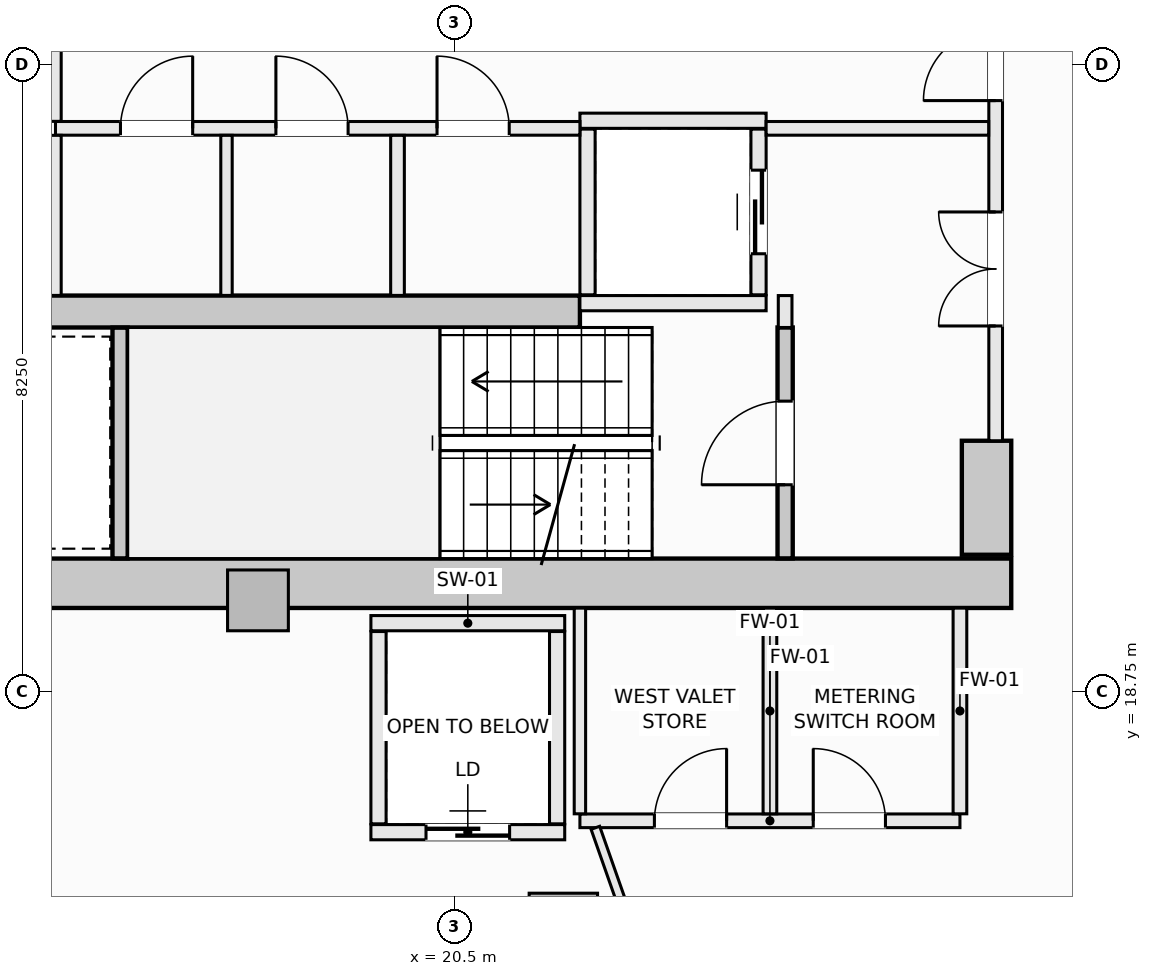
"""IFC4 building model, lengths in metres.
Left out: names, types, materials, properties, quantities, classifications, styles, units other than length and angle.
Written with IfcOpenShell. Run it as: python <this file> out.ifc"""

import sys

from ifc_helpers import new_model, si_unit, direction, frame, frame_2d, origin, origin_2d, place, context, subcontext, project, spatial, rectangle, extrude, element, fill, save


model = new_model("IFC4")
c1 = context("Model", 3, precision=1e-05, world=origin(), true_north=direction((0.0, 1.0)))
c2 = subcontext(c1, "Body", "Model", "MODEL_VIEW")
j1 = project(units=[si_unit("LENGTHUNIT", "METRE"), si_unit("PLANEANGLEUNIT", "RADIAN")], contexts=[c1])
p1 = place(None, origin())
s1 = spatial("IfcSite", under=j1, at=p1, CompositionType="ELEMENT")
p2 = place(p1, origin())
s2 = spatial("IfcBuilding", under=s1, at=p2, CompositionType="ELEMENT")
p3 = place(p2, frame((0.0, 0.0, 125.7)))
s3 = spatial("IfcBuildingStorey", under=s2, at=p3, CompositionType="ELEMENT", Elevation=125.7)
p4 = place(p3, frame((14.175, 20.175, -0.27), z_axis=(0.0, 0.0, 1.0), x_axis=(1.0, 0.0, 0.0)))
e1 = element("IfcWall", 1, at=p4, inside=s3, PredefinedType="SHEAR", context=c2, shape_type="SweptSolid", body=[
    extrude(rectangle(XDim=13.65, YDim=0.65, at=frame_2d((6.825, 0.0))), origin(), (0.0, 0.0, 1.0), 3.4),
])
p5 = place(p3, frame((27.5, 20.55, -0.27), z_axis=(0.0, 0.0, 1.0), x_axis=(0.0, 1.0, 0.0)))
e2 = element("IfcWall", 2, at=p5, inside=s3, PredefinedType="SHEAR", context=c2, shape_type="SweptSolid", body=[
    extrude(rectangle(XDim=1.5, YDim=0.65, at=frame_2d((0.75, 0.0))), origin(), (0.0, 0.0, 1.0), 3.4),
])
p6 = place(p3, frame((14.85, 23.75, -0.27), z_axis=(0.0, 0.0, 1.0), x_axis=(1.0, 0.0, 0.0)))
e3 = element("IfcWall", 3, at=p6, inside=s3, PredefinedType="SHEAR", context=c2, shape_type="SweptSolid", body=[
    extrude(rectangle(XDim=7.3, YDim=0.42, at=frame_2d((3.65, 0.0))), origin(), (0.0, 0.0, 1.0), 3.4),
])
p7 = place(p3, frame((21.932, 15.648, -0.27), z_axis=(0.0, 0.0, 1.0), x_axis=(1.0, 0.0, 0.0)))
e4 = element("IfcColumn", 4, at=p7, inside=s3, PredefinedType="COLUMN", context=c2, shape_type="SweptSolid", body=[
    extrude(rectangle(XDim=0.9, YDim=0.9, at=origin_2d()), origin(), (0.0, 0.0, 1.0), 3.4),
])
p8 = place(p3, frame((17.914, 19.95, -0.27), z_axis=(0.0, 0.0, 1.0), x_axis=(1.0, 0.0, 0.0)))
e5 = element("IfcColumn", 5, at=p8, inside=s3, PredefinedType="PILASTER", context=c2, shape_type="SweptSolid", body=[
    extrude(rectangle(XDim=0.8, YDim=0.8, at=origin_2d()), origin(), (0.0, 0.0, 1.0), 3.4),
])
p9 = place(p3, frame((24.85, 20.502, -0.27), z_axis=(0.0, 0.0, 1.0), x_axis=(0.0, 1.0, 0.0)))
e6 = element("IfcWall", 6, at=p9, inside=s3, PredefinedType="SHEAR", context=c2, shape_type="SweptSolid", body=[
    extrude(rectangle(XDim=3.038, YDim=0.2, at=frame_2d((1.519, 0.0))), origin(), (0.0, 0.0, 1.0), 3.4),
])
p10 = place(p9, frame((0.969, 0.0, 0.27)))
e7 = element("IfcOpeningElement", 7, at=p10, cuts=e6, PredefinedType="OPENING", context=c2, shape_type="SweptSolid", body=[
    extrude(rectangle(XDim=1.1, YDim=2.15, at=frame_2d((0.55, 1.075))), frame((0.0, 0.11, 0.0), z_axis=(0.0, -1.0, 0.0), x_axis=(1.0, 0.0, 0.0)), (0.0, 0.0, 1.0), 0.22),
])
p11 = place(p3, frame((16.1, 20.502, -0.27), z_axis=(0.0, 0.0, 1.0), x_axis=(0.0, 1.0, 0.0)))
e8 = element("IfcWall", 8, at=p11, inside=s3, PredefinedType="SHEAR", context=c2, shape_type="SweptSolid", body=[
    extrude(rectangle(XDim=3.036, YDim=0.2, at=frame_2d((1.518, 0.0))), origin(), (0.0, 0.0, 1.0), 3.4),
])
for number, where, z_axis, x_axis in (
    (9, (22.15, 26.26, 0.0), (0.0, 0.0, 1.0), (1.0, 0.0, 0.0)),
    (10, (22.15, 23.86, 0.0), (0.0, 0.0, 1.0), (1.0, 0.0, 0.0)),
):
    element("IfcWall", number, at=place(p3, frame(where, z_axis=z_axis, x_axis=x_axis)), inside=s3, PredefinedType="SOLIDWALL", context=c2, shape_type="SweptSolid", body=[
        extrude(rectangle(XDim=2.45, YDim=0.2, at=frame_2d((1.225, 0.0))), origin(), (0.0, 0.0, 1.0), 3.13),
    ])
p12 = place(p3, frame((22.25, 23.97, 0.0), z_axis=(0.0, 0.0, 1.0), x_axis=(0.0, 1.0, 0.0)))
e11 = element("IfcWall", 11, at=p12, inside=s3, PredefinedType="SOLIDWALL", context=c2, shape_type="SweptSolid", body=[
    extrude(rectangle(XDim=2.18, YDim=0.2, at=frame_2d((1.09, 0.0))), origin(), (0.0, 0.0, 1.0), 3.13),
])
p13 = place(p3, frame((24.5, 23.97, 0.0), z_axis=(0.0, 0.0, 1.0), x_axis=(0.0, 1.0, 0.0)))
e12 = element("IfcWall", 12, at=p13, inside=s3, PredefinedType="SOLIDWALL", context=c2, shape_type="SweptSolid", body=[
    extrude(rectangle(XDim=2.18, YDim=0.2, at=frame_2d((1.09, 0.0))), origin(), (0.0, 0.0, 1.0), 3.13),
])
p14 = place(p13, frame((0.54, 0.0, 0.0)))
e13 = element("IfcOpeningElement", 13, at=p14, cuts=e12, PredefinedType="OPENING", context=c2, shape_type="SweptSolid", body=[
    extrude(rectangle(XDim=1.1, YDim=2.2, at=frame_2d((0.55, 1.1))), frame((0.0, 0.11, 0.0), z_axis=(0.0, -1.0, 0.0), x_axis=(1.0, 0.0, 0.0)), (0.0, 0.0, 1.0), 0.22),
])
p15 = place(p3, frame((19.4, 19.65, 0.0), z_axis=(0.0, 0.0, 1.0), x_axis=(1.0, 0.0, 0.0)))
e14 = element("IfcWall", 14, at=p15, inside=s3, PredefinedType="SOLIDWALL", context=c2, shape_type="SweptSolid", body=[
    extrude(rectangle(XDim=2.55, YDim=0.2, at=frame_2d((1.275, 0.0))), origin(), (0.0, 0.0, 1.0), 3.13),
])
p16 = place(p3, frame((19.4, 16.9, 0.0), z_axis=(0.0, 0.0, 1.0), x_axis=(1.0, 0.0, 0.0)))
e15 = element("IfcWall", 15, at=p16, inside=s3, PredefinedType="SOLIDWALL", context=c2, shape_type="SweptSolid", body=[
    extrude(rectangle(XDim=2.55, YDim=0.2, at=frame_2d((1.275, 0.0))), origin(), (0.0, 0.0, 1.0), 3.13),
])
p17 = place(p16, frame((0.725, 0.0, 0.0)))
e16 = element("IfcOpeningElement", 16, at=p17, cuts=e15, PredefinedType="OPENING", context=c2, shape_type="SweptSolid", body=[
    extrude(rectangle(XDim=1.1, YDim=2.2, at=frame_2d((0.55, 1.1))), frame((0.0, 0.11, 0.0), z_axis=(0.0, -1.0, 0.0), x_axis=(1.0, 0.0, 0.0)), (0.0, 0.0, 1.0), 0.22),
])
for number, where, z_axis, x_axis in (
    (17, (19.5, 17.01, 0.0), (0.0, 0.0, 1.0), (0.0, 1.0, 0.0)),
    (18, (21.85, 17.01, 0.0), (0.0, 0.0, 1.0), (0.0, 1.0, 0.0)),
):
    element("IfcWall", number, at=place(p3, frame(where, z_axis=z_axis, x_axis=x_axis)), inside=s3, PredefinedType="SOLIDWALL", context=c2, shape_type="SweptSolid", body=[
        extrude(rectangle(XDim=2.53, YDim=0.2, at=frame_2d((1.265, 0.0))), origin(), (0.0, 0.0, 1.0), 3.13),
    ])
p18 = place(p3, frame((24.85, 23.54, 0.0), z_axis=(0.0, 0.0, 1.0), x_axis=(0.0, 1.0, 0.0)))
e19 = element("IfcWall", 19, at=p18, inside=s3, PredefinedType="SOLIDWALL", context=c2, shape_type="SweptSolid", body=[
    extrude(rectangle(XDim=0.42, YDim=0.18, at=frame_2d((0.21, 0.0))), origin(), (0.0, 0.0, 1.0), 3.13),
])
p19 = place(p3, frame((27.62, 22.05, 0.0), z_axis=(0.0, 0.0, 1.0), x_axis=(0.0, 1.0, 0.0)))
e20 = element("IfcWall", 20, at=p19, inside=s3, PredefinedType="SOLIDWALL", context=c2, shape_type="SweptSolid", body=[
    extrude(rectangle(XDim=9.9, YDim=0.18, at=frame_2d((4.95, 0.0))), origin(), (0.0, 0.0, 1.0), 3.13),
])
p20 = place(p19, frame((4.475, 0.0, 0.0)))
e21 = element("IfcOpeningElement", 21, at=p20, cuts=e20, PredefinedType="OPENING", context=c2, shape_type="SweptSolid", body=[
    extrude(rectangle(XDim=0.95, YDim=2.1, at=frame_2d((0.475, 1.05))), frame((0.0, 0.1, 0.0), z_axis=(0.0, -1.0, 0.0), x_axis=(1.0, 0.0, 0.0)), (0.0, 0.0, 1.0), 0.2),
])
p21 = place(p19, frame((6.89, 0.0, 0.0)))
e22 = element("IfcOpeningElement", 22, at=p21, cuts=e20, PredefinedType="OPENING", context=c2, shape_type="SweptSolid", body=[
    extrude(rectangle(XDim=1.5, YDim=2.2, at=frame_2d((0.75, 1.1))), frame((0.0, 0.1, 0.0), z_axis=(0.0, -1.0, 0.0), x_axis=(1.0, 0.0, 0.0)), (0.0, 0.0, 1.0), 0.2),
])
p22 = place(p19, frame((1.51, 0.0, 0.0)))
e23 = element("IfcOpeningElement", 23, at=p22, cuts=e20, PredefinedType="OPENING", context=c2, shape_type="SweptSolid", body=[
    extrude(rectangle(XDim=1.5, YDim=2.2, at=frame_2d((0.75, 1.1))), frame((0.0, 0.1, 0.0), z_axis=(0.0, -1.0, 0.0), x_axis=(1.0, 0.0, 0.0)), (0.0, 0.0, 1.0), 0.2),
])
p23 = place(p3, frame((15.25, 26.16, 0.0), z_axis=(0.0, 0.0, 1.0), x_axis=(1.0, 0.0, 0.0)))
e24 = element("IfcWall", 24, at=p23, inside=s3, PredefinedType="SOLIDWALL", context=c2, shape_type="SweptSolid", body=[
    extrude(rectangle(XDim=6.9, YDim=0.18, at=frame_2d((3.45, 0.0))), origin(), (0.0, 0.0, 1.0), 3.13),
])
p24 = place(p23, frame((5.02, 0.0, 0.0)))
e25 = element("IfcOpeningElement", 25, at=p24, cuts=e24, PredefinedType="OPENING", context=c2, shape_type="SweptSolid", body=[
    extrude(rectangle(XDim=0.95, YDim=2.1, at=frame_2d((0.475, 1.05))), frame((0.0, 0.1, 0.0), z_axis=(0.0, -1.0, 0.0), x_axis=(1.0, 0.0, 0.0)), (0.0, 0.0, 1.0), 0.2),
])
p25 = place(p23, frame((0.855, 0.0, 0.0)))
e26 = element("IfcOpeningElement", 26, at=p25, cuts=e24, PredefinedType="OPENING", context=c2, shape_type="SweptSolid", body=[
    extrude(rectangle(XDim=0.95, YDim=2.1, at=frame_2d((0.475, 1.05))), frame((0.0, 0.1, 0.0), z_axis=(0.0, -1.0, 0.0), x_axis=(1.0, 0.0, 0.0)), (0.0, 0.0, 1.0), 0.2),
])
p26 = place(p23, frame((2.9, 0.0, 0.0)))
e27 = element("IfcOpeningElement", 27, at=p26, cuts=e24, PredefinedType="OPENING", context=c2, shape_type="SweptSolid", body=[
    extrude(rectangle(XDim=0.95, YDim=2.1, at=frame_2d((0.475, 1.05))), frame((0.0, 0.1, 0.0), z_axis=(0.0, -1.0, 0.0), x_axis=(1.0, 0.0, 0.0)), (0.0, 0.0, 1.0), 0.2),
])
p27 = place(p3, frame((24.6, 26.16, 0.0), z_axis=(0.0, 0.0, 1.0), x_axis=(1.0, 0.0, 0.0)))
e28 = element("IfcWall", 28, at=p27, inside=s3, PredefinedType="SOLIDWALL", context=c2, shape_type="SweptSolid", body=[
    extrude(rectangle(XDim=2.928, YDim=0.18, at=frame_2d((1.464, 0.0))), origin(), (0.0, 0.0, 1.0), 3.13),
])
p28 = place(p3, frame((15.25, 23.962, 0.0), z_axis=(0.0, 0.0, 1.0), x_axis=(0.0, 1.0, 0.0)))
e29 = element("IfcWall", 29, at=p28, inside=s3, PredefinedType="PARTITIONING", context=c2, shape_type="SweptSolid", body=[
    extrude(rectangle(XDim=2.106, YDim=0.15, at=frame_2d((1.053, 0.0))), origin(), (0.0, 0.0, 1.0), 3.13),
])
p29 = place(p3, frame((15.25, 26.252, 0.0), z_axis=(0.0, 0.0, 1.0), x_axis=(0.0, 1.0, 0.0)))
e30 = element("IfcWall", 30, at=p29, inside=s3, PredefinedType="PARTITIONING", context=c2, shape_type="SweptSolid", body=[
    extrude(rectangle(XDim=1.496, YDim=0.15, at=frame_2d((0.748, 0.0))), origin(), (0.0, 0.0, 1.0), 3.13),
])
p30 = place(p3, frame((19.75, 23.962, 0.0), z_axis=(0.0, 0.0, 1.0), x_axis=(0.0, 1.0, 0.0)))
e31 = element("IfcWall", 31, at=p30, inside=s3, PredefinedType="SOLIDWALL", context=c2, shape_type="SweptSolid", body=[
    extrude(rectangle(XDim=2.106, YDim=0.18, at=frame_2d((1.053, 0.0))), origin(), (0.0, 0.0, 1.0), 3.13),
])
p31 = place(p3, frame((17.5, 23.962, 0.0), z_axis=(0.0, 0.0, 1.0), x_axis=(0.0, 1.0, 0.0)))
e32 = element("IfcWall", 32, at=p31, inside=s3, PredefinedType="PARTITIONING", context=c2, shape_type="SweptSolid", body=[
    extrude(rectangle(XDim=2.106, YDim=0.15, at=frame_2d((1.053, 0.0))), origin(), (0.0, 0.0, 1.0), 3.13),
])
p32 = place(p3, frame((22.15, 17.05, 0.0), z_axis=(0.0, 0.0, 1.0), x_axis=(1.0, 0.0, 0.0)))
e33 = element("IfcWall", 33, at=p32, inside=s3, PredefinedType="SOLIDWALL", context=c2, shape_type="SweptSolid", body=[
    extrude(rectangle(XDim=5.0, YDim=0.18, at=frame_2d((2.5, 0.0))), origin(), (0.0, 0.0, 1.0), 3.13),
])
p33 = place(p32, frame((0.98, 0.0, 0.0)))
e34 = element("IfcOpeningElement", 34, at=p33, cuts=e33, PredefinedType="OPENING", context=c2, shape_type="SweptSolid", body=[
    extrude(rectangle(XDim=0.95, YDim=2.1, at=frame_2d((0.475, 1.05))), frame((0.0, 0.1, 0.0), z_axis=(0.0, -1.0, 0.0), x_axis=(1.0, 0.0, 0.0)), (0.0, 0.0, 1.0), 0.2),
])
p34 = place(p32, frame((3.07, 0.0, 0.0)))
e35 = element("IfcOpeningElement", 35, at=p34, cuts=e33, PredefinedType="OPENING", context=c2, shape_type="SweptSolid", body=[
    extrude(rectangle(XDim=0.95, YDim=2.1, at=frame_2d((0.475, 1.05))), frame((0.0, 0.1, 0.0), z_axis=(0.0, -1.0, 0.0), x_axis=(1.0, 0.0, 0.0)), (0.0, 0.0, 1.0), 0.2),
])
p35 = place(p3, frame((22.15, 17.142, 0.0), z_axis=(0.0, 0.0, 1.0), x_axis=(0.0, 1.0, 0.0)))
e36 = element("IfcWall", 36, at=p35, inside=s3, PredefinedType="PARTITIONING", context=c2, shape_type="SweptSolid", body=[
    extrude(rectangle(XDim=2.706, YDim=0.15, at=frame_2d((1.353, 0.0))), origin(), (0.0, 0.0, 1.0), 3.13),
])
for number, where, z_axis, x_axis in (
    (37, (24.65, 17.142, 0.0), (0.0, 0.0, 1.0), (0.0, 1.0, 0.0)),
    (38, (27.15, 17.142, 0.0), (0.0, 0.0, 1.0), (0.0, 1.0, 0.0)),
):
    element("IfcWall", number, at=place(p3, frame(where, z_axis=z_axis, x_axis=x_axis)), inside=s3, PredefinedType="SOLIDWALL", context=c2, shape_type="SweptSolid", body=[
        extrude(rectangle(XDim=2.706, YDim=0.18, at=frame_2d((1.353, 0.0))), origin(), (0.0, 0.0, 1.0), 3.13),
    ])
p36 = place(p3, frame((22.353, 16.958, 0.0), z_axis=(0.0, 0.0, 1.0), x_axis=(0.331370038458, -0.943500873138, 0.0)))
e39 = element("IfcWall", 39, at=p36, inside=s3, PredefinedType="PARTITIONING", context=c2, shape_type="SweptSolid", body=[
    extrude(rectangle(XDim=1.216, YDim=0.12, at=frame_2d((0.608, 0.0))), origin(), (0.0, 0.0, 1.0), 3.13),
])
p37 = place(p10, origin())
e40 = element("IfcDoor", 40, at=p37, inside=s3, OperationType="SINGLE_SWING_LEFT", PredefinedType="DOOR", context=c2, shape_type="SweptSolid", body=[
    extrude(rectangle(XDim=1.1, YDim=2.15, at=frame_2d((0.55, 1.075))), frame((0.0, 0.025, 0.0), z_axis=(0.0, -1.0, 0.0), x_axis=(1.0, 0.0, 0.0)), (0.0, 0.0, 1.0), 0.05),
])
fill(e7, e40)
p38 = place(p14, origin())
e41 = element("IfcDoor", 41, at=p38, inside=s3, OperationType="SLIDING_TO_LEFT", PredefinedType="DOOR", context=c2, shape_type="SweptSolid", body=[
    extrude(rectangle(XDim=1.1, YDim=2.2, at=frame_2d((0.55, 1.1))), frame((0.0, 0.025, 0.0), z_axis=(0.0, -1.0, 0.0), x_axis=(1.0, 0.0, 0.0)), (0.0, 0.0, 1.0), 0.05),
])
fill(e13, e41)
p39 = place(p17, origin())
e42 = element("IfcDoor", 42, at=p39, inside=s3, OperationType="SLIDING_TO_LEFT", PredefinedType="DOOR", context=c2, shape_type="SweptSolid", body=[
    extrude(rectangle(XDim=1.1, YDim=2.2, at=frame_2d((0.55, 1.1))), frame((0.0, 0.025, 0.0), z_axis=(0.0, -1.0, 0.0), x_axis=(1.0, 0.0, 0.0)), (0.0, 0.0, 1.0), 0.05),
])
fill(e16, e42)
p40 = place(p20, origin())
e43 = element("IfcDoor", 43, at=p40, inside=s3, OperationType="SINGLE_SWING_LEFT", PredefinedType="DOOR", context=c2, shape_type="SweptSolid", body=[
    extrude(rectangle(XDim=0.95, YDim=2.1, at=frame_2d((0.475, 1.05))), frame((0.0, 0.025, 0.0), z_axis=(0.0, -1.0, 0.0), x_axis=(1.0, 0.0, 0.0)), (0.0, 0.0, 1.0), 0.05),
])
fill(e21, e43)
p41 = place(p22, origin())
e44 = element("IfcDoor", 44, at=p41, inside=s3, OperationType="DOUBLE_DOOR_SINGLE_SWING", PredefinedType="DOOR", context=c2, shape_type="SweptSolid", body=[
    extrude(rectangle(XDim=1.5, YDim=2.2, at=frame_2d((0.75, 1.1))), frame((0.0, 0.025, 0.0), z_axis=(0.0, -1.0, 0.0), x_axis=(1.0, 0.0, 0.0)), (0.0, 0.0, 1.0), 0.05),
])
fill(e23, e44)
p42 = place(p24, origin())
e45 = element("IfcDoor", 45, at=p42, inside=s3, OperationType="SINGLE_SWING_LEFT", PredefinedType="DOOR", context=c2, shape_type="SweptSolid", body=[
    extrude(rectangle(XDim=0.95, YDim=2.1, at=frame_2d((0.475, 1.05))), frame((0.0, 0.025, 0.0), z_axis=(0.0, -1.0, 0.0), x_axis=(1.0, 0.0, 0.0)), (0.0, 0.0, 1.0), 0.05),
])
fill(e25, e45)
p43 = place(p25, origin())
e46 = element("IfcDoor", 46, at=p43, inside=s3, OperationType="SINGLE_SWING_RIGHT", PredefinedType="DOOR", context=c2, shape_type="SweptSolid", body=[
    extrude(rectangle(XDim=0.95, YDim=2.1, at=frame_2d((0.475, 1.05))), frame((0.0, 0.025, 0.0), z_axis=(0.0, -1.0, 0.0), x_axis=(1.0, 0.0, 0.0)), (0.0, 0.0, 1.0), 0.05),
])
fill(e26, e46)
p44 = place(p26, origin())
e47 = element("IfcDoor", 47, at=p44, inside=s3, OperationType="SINGLE_SWING_LEFT", PredefinedType="DOOR", context=c2, shape_type="SweptSolid", body=[
    extrude(rectangle(XDim=0.95, YDim=2.1, at=frame_2d((0.475, 1.05))), frame((0.0, 0.025, 0.0), z_axis=(0.0, -1.0, 0.0), x_axis=(1.0, 0.0, 0.0)), (0.0, 0.0, 1.0), 0.05),
])
fill(e27, e47)
p45 = place(p33, origin())
e48 = element("IfcDoor", 48, at=p45, inside=s3, OperationType="SINGLE_SWING_RIGHT", PredefinedType="DOOR", context=c2, shape_type="SweptSolid", body=[
    extrude(rectangle(XDim=0.95, YDim=2.1, at=frame_2d((0.475, 1.05))), frame((0.0, 0.025, 0.0), z_axis=(0.0, -1.0, 0.0), x_axis=(1.0, 0.0, 0.0)), (0.0, 0.0, 1.0), 0.05),
])
fill(e34, e48)
p46 = place(p34, origin())
e49 = element("IfcDoor", 49, at=p46, inside=s3, OperationType="SINGLE_SWING_LEFT", PredefinedType="DOOR", context=c2, shape_type="SweptSolid", body=[
    extrude(rectangle(XDim=0.95, YDim=2.1, at=frame_2d((0.475, 1.05))), frame((0.0, 0.025, 0.0), z_axis=(0.0, -1.0, 0.0), x_axis=(1.0, 0.0, 0.0)), (0.0, 0.0, 1.0), 0.05),
])
fill(e35, e49)
save(model, sys.argv[1])
